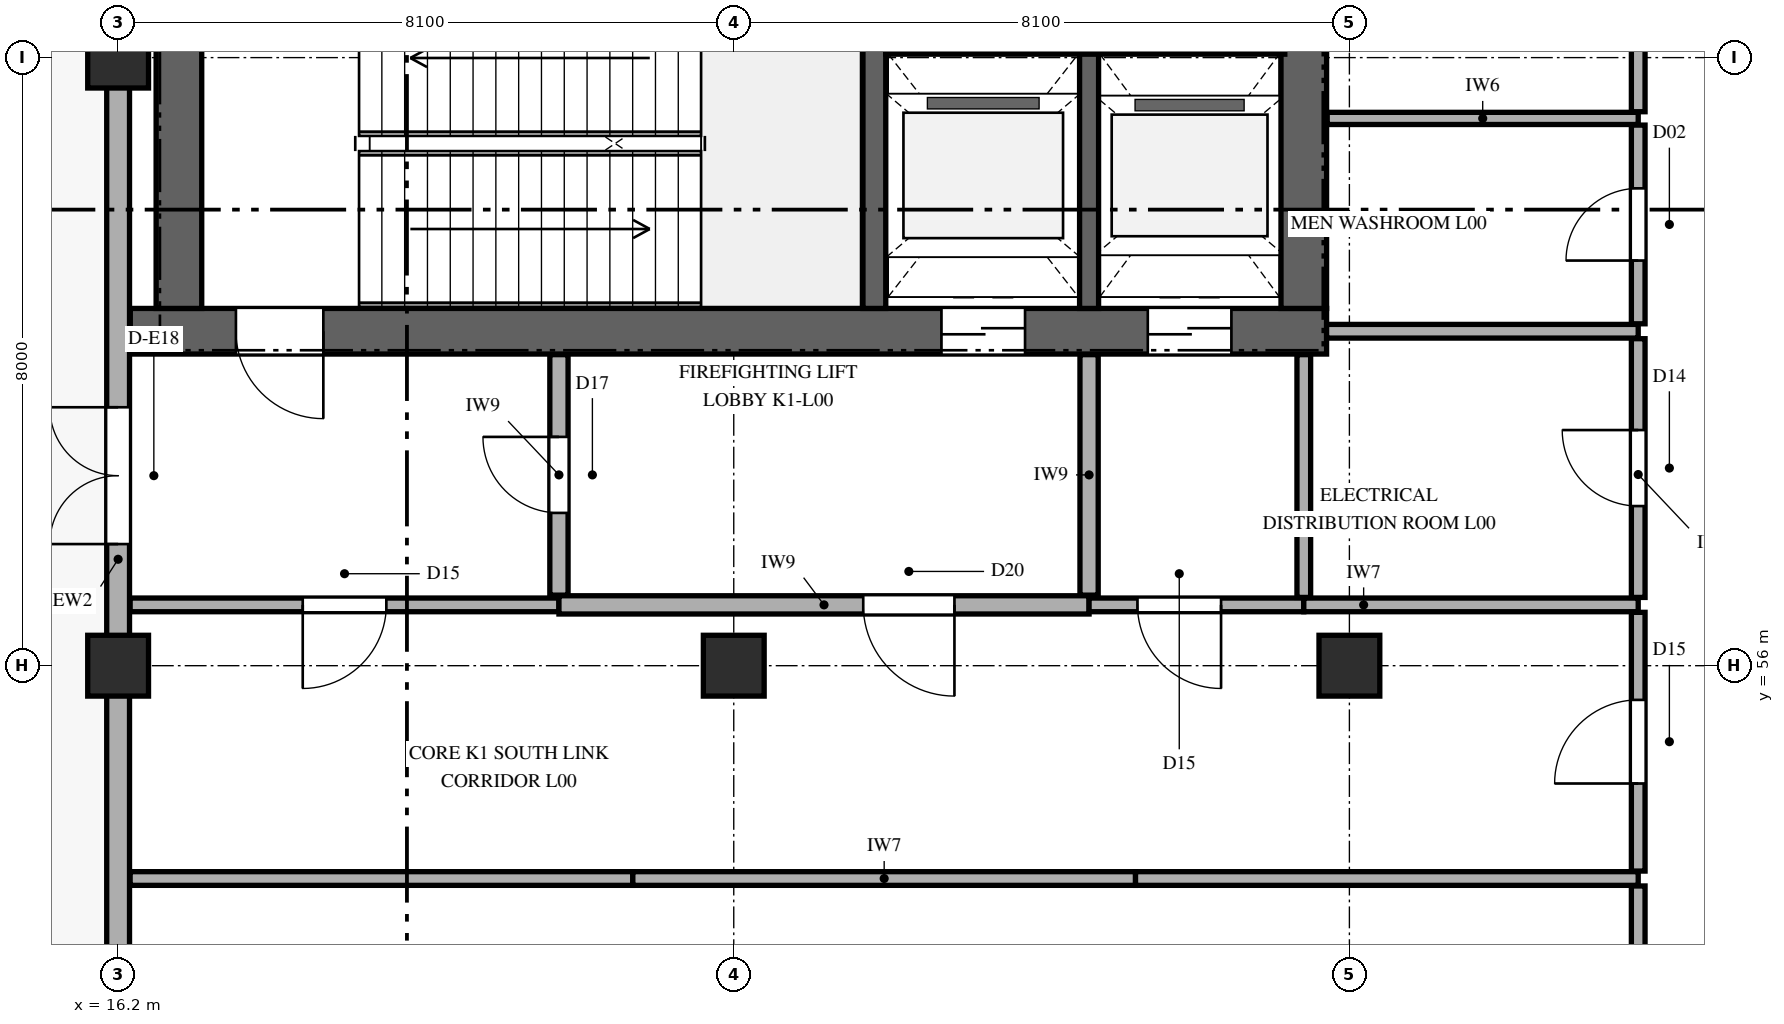
"""IFC4 building model, lengths in metres.
Left out: names, types, materials, properties, quantities, classifications, styles, units other than length and angle.
Written with IfcOpenShell. Run it as: python <this file> out.ifc"""

import sys

from ifc_helpers import new_model, si_unit, direction, frame, frame_2d, origin, origin_2d, place, context, subcontext, project, spatial, rectangle, extrude, element, fill, save


model = new_model("IFC4")
c1 = context("Model", 3, precision=1e-05, world=origin(), true_north=direction((0.0, 1.0)))
c2 = subcontext(c1, "Body", "Model", "MODEL_VIEW")
j1 = project(units=[si_unit("LENGTHUNIT", "METRE"), si_unit("PLANEANGLEUNIT", "RADIAN")], contexts=[c1])
p1 = place(None, origin())
s1 = spatial("IfcSite", under=j1, at=p1, CompositionType="ELEMENT")
p2 = place(p1, origin())
s2 = spatial("IfcBuilding", under=s1, at=p2, CompositionType="ELEMENT")
p3 = place(p2, origin())
s3 = spatial("IfcBuildingStorey", under=s2, at=p3, CompositionType="ELEMENT", Elevation=0.0)
p4 = place(p3, frame((16.36, 60.4, 0.0), z_axis=(0.0, 0.0, 1.0), x_axis=(1.0, 0.0, 0.0)))
e1 = element("IfcWall", 1, at=p4, inside=s3, PredefinedType="SHEAR", context=c2, shape_type="SweptSolid", body=[
    extrude(rectangle(XDim=15.74, YDim=0.6, at=frame_2d((7.87, 0.0))), origin(), (0.0, 0.0, 1.0), 5.4),
])
p5 = place(p4, frame((1.39, 0.0, 0.0)))
e2 = element("IfcOpeningElement", 2, at=p5, cuts=e1, PredefinedType="OPENING", context=c2, shape_type="SweptSolid", body=[
    extrude(rectangle(XDim=1.15, YDim=2.25, at=frame_2d((0.575, 1.125))), frame((0.0, 0.31, 0.0), z_axis=(0.0, -1.0, 0.0), x_axis=(1.0, 0.0, 0.0)), (0.0, 0.0, 1.0), 0.62),
])
p6 = place(p4, frame((10.673, 0.0, 0.0)))
e3 = element("IfcOpeningElement", 3, at=p6, cuts=e1, PredefinedType="OPENING", context=c2, shape_type="SweptSolid", body=[
    extrude(rectangle(XDim=1.1, YDim=2.2, at=frame_2d((0.55, 1.1))), frame((0.0, 0.31, 0.0), z_axis=(0.0, -1.0, 0.0), x_axis=(1.0, 0.0, 0.0)), (0.0, 0.0, 1.0), 0.62),
])
p7 = place(p4, frame((13.387, 0.0, 0.0)))
e4 = element("IfcOpeningElement", 4, at=p7, cuts=e1, PredefinedType="OPENING", context=c2, shape_type="SweptSolid", body=[
    extrude(rectangle(XDim=1.1, YDim=2.2, at=frame_2d((0.55, 1.1))), frame((0.0, 0.31, 0.0), z_axis=(0.0, -1.0, 0.0), x_axis=(1.0, 0.0, 0.0)), (0.0, 0.0, 1.0), 0.62),
])
for number, where, z_axis, x_axis in (
    (5, (17.0, 60.7, 0.0), (0.0, 0.0, 1.0), (0.0, 1.0, 0.0)),
    (6, (31.8, 60.7, 0.0), (0.0, 0.0, 1.0), (0.0, 1.0, 0.0)),
):
    element("IfcWall", number, at=place(p3, frame(where, z_axis=z_axis, x_axis=x_axis)), inside=s3, PredefinedType="SHEAR", context=c2, shape_type="SweptSolid", body=[
        extrude(rectangle(XDim=7.8, YDim=0.6, at=frame_2d((3.9, 0.0))), origin(), (0.0, 0.0, 1.0), 5.4),
    ])
p8 = place(p3, frame((26.15, 60.7, 0.0), z_axis=(0.0, 0.0, 1.0), x_axis=(0.0, 1.0, 0.0)))
e7 = element("IfcWall", 7, at=p8, inside=s3, PredefinedType="SHEAR", context=c2, shape_type="SweptSolid", body=[
    extrude(rectangle(XDim=7.8, YDim=0.3, at=frame_2d((3.9, 0.0))), origin(), (0.0, 0.0, 1.0), 5.4),
])
p9 = place(p3, frame((28.975, 60.7, 0.0), z_axis=(0.0, 0.0, 1.0), x_axis=(0.0, 1.0, 0.0)))
e8 = element("IfcWall", 8, at=p9, inside=s3, PredefinedType="SHEAR", context=c2, shape_type="SweptSolid", body=[
    extrude(rectangle(XDim=7.8, YDim=0.25, at=frame_2d((3.9, 0.0))), origin(), (0.0, 0.0, 1.0), 5.4),
])
for number, where, z_axis, x_axis in (
    (9, (16.2, 56.0, 0.0), (0.0, 0.0, 1.0), (1.0, 0.0, 0.0)),
    (10, (16.2, 64.0, 0.0), (0.0, 0.0, 1.0), (1.0, 0.0, 0.0)),
    (11, (24.3, 56.0, 0.0), (0.0, 0.0, 1.0), (1.0, 0.0, 0.0)),
    (12, (32.4, 56.0, 0.0), (0.0, 0.0, 1.0), (1.0, 0.0, 0.0)),
):
    element("IfcColumn", number, at=place(p3, frame(where, z_axis=z_axis, x_axis=x_axis)), inside=s3, PredefinedType="COLUMN", context=c2, shape_type="SweptSolid", body=[
        extrude(rectangle(XDim=0.8, YDim=0.8, at=origin_2d()), origin(), (0.0, 0.0, 1.0), 5.4),
    ])
p10 = place(p3, frame((16.2, 65.2, 0.0), z_axis=(0.0, 0.0, 1.0), x_axis=(0.0, -1.0, 0.0)))
e13 = element("IfcWall", 13, at=p10, inside=s3, PredefinedType="SOLIDWALL", context=c2, shape_type="SweptSolid", body=[
    extrude(rectangle(XDim=15.6, YDim=0.3, at=frame_2d((7.8, 0.0))), origin(), (0.0, 0.0, 1.0), 4.512),
])
p11 = place(p10, frame((5.8, 0.0, 0.0)))
e14 = element("IfcOpeningElement", 14, at=p11, cuts=e13, PredefinedType="OPENING", context=c2, shape_type="SweptSolid", body=[
    extrude(rectangle(XDim=1.8, YDim=2.4, at=frame_2d((0.9, 1.2))), frame((0.0, 0.16, 0.0), z_axis=(0.0, -1.0, 0.0), x_axis=(1.0, 0.0, 0.0)), (0.0, 0.0, 1.0), 0.32),
])
p12 = place(p3, frame((26.3, 64.12, 0.0), z_axis=(0.0, 0.0, 1.0), x_axis=(1.0, 0.0, 0.0)))
e15 = element("IfcWall", 15, at=p12, inside=s3, PredefinedType="PARTITIONING", context=c2, shape_type="SweptSolid", body=[
    extrude(rectangle(XDim=5.25, YDim=0.15, at=frame_2d((2.625, 0.0))), origin(), (0.0, 0.0, 1.0), 5.12),
])
for number, where, z_axis, x_axis in (
    (16, (16.358, 53.2, 0.0), (0.0, 0.0, 1.0), (1.0, 0.0, 0.0)),
    (17, (22.972, 53.2, 0.0), (0.0, 0.0, 1.0), (1.0, 0.0, 0.0)),
    (18, (29.586, 53.2, 0.0), (0.0, 0.0, 1.0), (1.0, 0.0, 0.0)),
):
    element("IfcWall", number, at=place(p3, frame(where, z_axis=z_axis, x_axis=x_axis)), inside=s3, PredefinedType="PARTITIONING", context=c2, shape_type="SweptSolid", body=[
        extrude(rectangle(XDim=6.614, YDim=0.18, at=frame_2d((3.307, 0.0))), origin(), (0.0, 0.0, 1.0), 5.12),
    ])
p13 = place(p3, frame((16.358, 56.8, 0.0), z_axis=(0.0, 0.0, 1.0), x_axis=(1.0, 0.0, 0.0)))
e19 = element("IfcWall", 19, at=p13, inside=s3, PredefinedType="PARTITIONING", context=c2, shape_type="SweptSolid", body=[
    extrude(rectangle(XDim=5.642, YDim=0.18, at=frame_2d((2.821, 0.0))), origin(), (0.0, 0.0, 1.0), 5.12),
])
p14 = place(p13, frame((2.271, 0.0, 0.0)))
e20 = element("IfcOpeningElement", 20, at=p14, cuts=e19, PredefinedType="OPENING", context=c2, shape_type="SweptSolid", body=[
    extrude(rectangle(XDim=1.1, YDim=2.2, at=frame_2d((0.55, 1.1))), frame((0.0, 0.1, 0.0), z_axis=(0.0, -1.0, 0.0), x_axis=(1.0, 0.0, 0.0)), (0.0, 0.0, 1.0), 0.2),
])
p15 = place(p3, frame((22.0, 56.8, 0.0), z_axis=(0.0, 0.0, 1.0), x_axis=(1.0, 0.0, 0.0)))
e21 = element("IfcWall", 21, at=p15, inside=s3, PredefinedType="PARTITIONING", context=c2, shape_type="SweptSolid", body=[
    extrude(rectangle(XDim=6.975, YDim=0.24, at=frame_2d((3.488, 0.0))), origin(), (0.0, 0.0, 1.0), 5.12),
])
p16 = place(p15, frame((4.003, 0.0, 0.0)))
e22 = element("IfcOpeningElement", 22, at=p16, cuts=e21, PredefinedType="OPENING", context=c2, shape_type="SweptSolid", body=[
    extrude(rectangle(XDim=1.2, YDim=2.3, at=frame_2d((0.6, 1.15))), frame((0.0, 0.13, 0.0), z_axis=(0.0, -1.0, 0.0), x_axis=(1.0, 0.0, 0.0)), (0.0, 0.0, 1.0), 0.26),
])
p17 = place(p3, frame((28.975, 56.8, 0.0), z_axis=(0.0, 0.0, 1.0), x_axis=(1.0, 0.0, 0.0)))
e23 = element("IfcWall", 23, at=p17, inside=s3, PredefinedType="PARTITIONING", context=c2, shape_type="SweptSolid", body=[
    extrude(rectangle(XDim=2.825, YDim=0.18, at=frame_2d((1.413, 0.0))), origin(), (0.0, 0.0, 1.0), 5.12),
])
p18 = place(p17, frame((0.636, 0.0, 0.0)))
e24 = element("IfcOpeningElement", 24, at=p18, cuts=e23, PredefinedType="OPENING", context=c2, shape_type="SweptSolid", body=[
    extrude(rectangle(XDim=1.1, YDim=2.2, at=frame_2d((0.55, 1.1))), frame((0.0, 0.1, 0.0), z_axis=(0.0, -1.0, 0.0), x_axis=(1.0, 0.0, 0.0)), (0.0, 0.0, 1.0), 0.2),
])
p19 = place(p3, frame((31.8, 56.8, 0.0), z_axis=(0.0, 0.0, 1.0), x_axis=(1.0, 0.0, 0.0)))
e25 = element("IfcWall", 25, at=p19, inside=s3, PredefinedType="PARTITIONING", context=c2, shape_type="SweptSolid", body=[
    extrude(rectangle(XDim=4.4, YDim=0.18, at=frame_2d((2.2, 0.0))), origin(), (0.0, 0.0, 1.0), 5.12),
])
p20 = place(p3, frame((32.1, 60.4, 0.0), z_axis=(0.0, 0.0, 1.0), x_axis=(1.0, 0.0, 0.0)))
e26 = element("IfcWall", 26, at=p20, inside=s3, PredefinedType="PARTITIONING", context=c2, shape_type="SweptSolid", body=[
    extrude(rectangle(XDim=4.1, YDim=0.18, at=frame_2d((2.05, 0.0))), origin(), (0.0, 0.0, 1.0), 5.12),
])
p21 = place(p3, frame((32.108, 63.2, 0.0), z_axis=(0.0, 0.0, 1.0), x_axis=(1.0, 0.0, 0.0)))
e27 = element("IfcWall", 27, at=p21, inside=s3, PredefinedType="PARTITIONING", context=c2, shape_type="SweptSolid", body=[
    extrude(rectangle(XDim=4.092, YDim=0.16, at=frame_2d((2.046, 0.0))), origin(), (0.0, 0.0, 1.0), 5.12),
])
p22 = place(p3, frame((22.0, 56.928, 0.0), z_axis=(0.0, 0.0, 1.0), x_axis=(0.0, 1.0, 0.0)))
e28 = element("IfcWall", 28, at=p22, inside=s3, PredefinedType="PARTITIONING", context=c2, shape_type="SweptSolid", body=[
    extrude(rectangle(XDim=3.164, YDim=0.24, at=frame_2d((1.582, 0.0))), origin(), (0.0, 0.0, 1.0), 5.12),
])
p23 = place(p22, frame((1.082, 0.0, 0.0)))
e29 = element("IfcOpeningElement", 29, at=p23, cuts=e28, PredefinedType="OPENING", context=c2, shape_type="SweptSolid", body=[
    extrude(rectangle(XDim=1.0, YDim=2.2, at=frame_2d((0.5, 1.1))), frame((0.0, 0.13, 0.0), z_axis=(0.0, -1.0, 0.0), x_axis=(1.0, 0.0, 0.0)), (0.0, 0.0, 1.0), 0.26),
])
p24 = place(p3, frame((28.975, 56.928, 0.0), z_axis=(0.0, 0.0, 1.0), x_axis=(0.0, 1.0, 0.0)))
e30 = element("IfcWall", 30, at=p24, inside=s3, PredefinedType="PARTITIONING", context=c2, shape_type="SweptSolid", body=[
    extrude(rectangle(XDim=3.164, YDim=0.24, at=frame_2d((1.582, 0.0))), origin(), (0.0, 0.0, 1.0), 5.12),
])
p25 = place(p3, frame((31.8, 56.898, 0.0), z_axis=(0.0, 0.0, 1.0), x_axis=(0.0, 1.0, 0.0)))
e31 = element("IfcWall", 31, at=p25, inside=s3, PredefinedType="PARTITIONING", context=c2, shape_type="SweptSolid", body=[
    extrude(rectangle(XDim=3.194, YDim=0.18, at=frame_2d((1.597, 0.0))), origin(), (0.0, 0.0, 1.0), 5.12),
])
p26 = place(p3, frame((36.2, 34.098, 0.0), z_axis=(0.0, 0.0, 1.0), x_axis=(0.0, 1.0, 0.0)))
e32 = element("IfcWall", 32, at=p26, inside=s3, PredefinedType="PARTITIONING", context=c2, shape_type="SweptSolid", body=[
    extrude(rectangle(XDim=19.004, YDim=0.18, at=frame_2d((9.502, 0.0))), origin(), (0.0, 0.0, 1.0), 4.705),
])
p27 = place(p26, frame((8.702, 0.0, 0.0)))
e33 = element("IfcOpeningElement", 33, at=p27, cuts=e32, PredefinedType="OPENING", context=c2, shape_type="SweptSolid", body=[
    extrude(rectangle(XDim=1.6, YDim=2.35, at=frame_2d((0.8, 1.175))), frame((0.0, 0.1, 0.0), z_axis=(0.0, -1.0, 0.0), x_axis=(1.0, 0.0, 0.0)), (0.0, 0.0, 1.0), 0.2),
])
p28 = place(p3, frame((36.2, 53.298, 0.0), z_axis=(0.0, 0.0, 1.0), x_axis=(0.0, 1.0, 0.0)))
e34 = element("IfcWall", 34, at=p28, inside=s3, PredefinedType="PARTITIONING", context=c2, shape_type="SweptSolid", body=[
    extrude(rectangle(XDim=3.404, YDim=0.18, at=frame_2d((1.702, 0.0))), origin(), (0.0, 0.0, 1.0), 4.705),
])
p29 = place(p28, frame((1.152, 0.0, 0.0)))
e35 = element("IfcOpeningElement", 35, at=p29, cuts=e34, PredefinedType="OPENING", context=c2, shape_type="SweptSolid", body=[
    extrude(rectangle(XDim=1.1, YDim=2.2, at=frame_2d((0.55, 1.1))), frame((0.0, 0.1, 0.0), z_axis=(0.0, -1.0, 0.0), x_axis=(1.0, 0.0, 0.0)), (0.0, 0.0, 1.0), 0.2),
])
p30 = place(p3, frame((36.2, 56.898, 0.0), z_axis=(0.0, 0.0, 1.0), x_axis=(0.0, 1.0, 0.0)))
e36 = element("IfcWall", 36, at=p30, inside=s3, PredefinedType="PARTITIONING", context=c2, shape_type="SweptSolid", body=[
    extrude(rectangle(XDim=3.404, YDim=0.18, at=frame_2d((1.702, 0.0))), origin(), (0.0, 0.0, 1.0), 5.12),
])
p31 = place(p30, frame((1.202, 0.0, 0.0)))
e37 = element("IfcOpeningElement", 37, at=p31, cuts=e36, PredefinedType="OPENING", context=c2, shape_type="SweptSolid", body=[
    extrude(rectangle(XDim=1.0, YDim=2.15, at=frame_2d((0.5, 1.075))), frame((0.0, 0.1, 0.0), z_axis=(0.0, -1.0, 0.0), x_axis=(1.0, 0.0, 0.0)), (0.0, 0.0, 1.0), 0.2),
])
p32 = place(p3, frame((36.2, 60.498, 0.0), z_axis=(0.0, 0.0, 1.0), x_axis=(0.0, 1.0, 0.0)))
e38 = element("IfcWall", 38, at=p32, inside=s3, PredefinedType="PARTITIONING", context=c2, shape_type="SweptSolid", body=[
    extrude(rectangle(XDim=2.614, YDim=0.18, at=frame_2d((1.307, 0.0))), origin(), (0.0, 0.0, 1.0), 5.12),
])
p33 = place(p32, frame((0.832, 0.0, 0.0)))
e39 = element("IfcOpeningElement", 39, at=p33, cuts=e38, PredefinedType="OPENING", context=c2, shape_type="SweptSolid", body=[
    extrude(rectangle(XDim=0.95, YDim=2.1, at=frame_2d((0.475, 1.05))), frame((0.0, 0.1, 0.0), z_axis=(0.0, -1.0, 0.0), x_axis=(1.0, 0.0, 0.0)), (0.0, 0.0, 1.0), 0.2),
])
p34 = place(p3, frame((36.2, 63.288, 0.0), z_axis=(0.0, 0.0, 1.0), x_axis=(0.0, 1.0, 0.0)))
e40 = element("IfcWall", 40, at=p34, inside=s3, PredefinedType="PARTITIONING", context=c2, shape_type="SweptSolid", body=[
    extrude(rectangle(XDim=2.624, YDim=0.18, at=frame_2d((1.312, 0.0))), origin(), (0.0, 0.0, 1.0), 5.12),
])
p35 = place(p34, frame((0.837, 0.0, 0.0)))
e41 = element("IfcOpeningElement", 41, at=p35, cuts=e40, PredefinedType="OPENING", context=c2, shape_type="SweptSolid", body=[
    extrude(rectangle(XDim=0.95, YDim=2.1, at=frame_2d((0.475, 1.05))), frame((0.0, 0.1, 0.0), z_axis=(0.0, -1.0, 0.0), x_axis=(1.0, 0.0, 0.0)), (0.0, 0.0, 1.0), 0.2),
])
p36 = place(p11, frame((1.8, 0.0, 0.0), z_axis=(0.0, 0.0, 1.0), x_axis=(-1.0, 0.0, 0.0)))
e42 = element("IfcDoor", 42, at=p36, inside=s3, OperationType="DOUBLE_DOOR_SINGLE_SWING", PredefinedType="DOOR", context=c2, shape_type="SweptSolid", body=[
    extrude(rectangle(XDim=1.8, YDim=2.4, at=frame_2d((0.9, 1.2))), frame((0.0, 0.025, 0.0), z_axis=(0.0, -1.0, 0.0), x_axis=(1.0, 0.0, 0.0)), (0.0, 0.0, 1.0), 0.05),
])
fill(e14, e42)
p37 = place(p5, frame((1.15, 0.0, 0.0), z_axis=(0.0, 0.0, 1.0), x_axis=(-1.0, 0.0, 0.0)))
e43 = element("IfcDoor", 43, at=p37, inside=s3, OperationType="SINGLE_SWING_RIGHT", PredefinedType="DOOR", context=c2, shape_type="SweptSolid", body=[
    extrude(rectangle(XDim=1.15, YDim=2.25, at=frame_2d((0.575, 1.125))), frame((0.0, 0.025, 0.0), z_axis=(0.0, -1.0, 0.0), x_axis=(1.0, 0.0, 0.0)), (0.0, 0.0, 1.0), 0.05),
])
fill(e2, e43)
p38 = place(p6, frame((1.1, 0.0, 0.0), z_axis=(0.0, 0.0, 1.0), x_axis=(-1.0, 0.0, 0.0)))
e44 = element("IfcDoor", 44, at=p38, inside=s3, OperationType="DOUBLE_DOOR_SLIDING", PredefinedType="DOOR", context=c2, shape_type="SweptSolid", body=[
    extrude(rectangle(XDim=1.1, YDim=2.2, at=frame_2d((0.55, 1.1))), frame((0.0, 0.025, 0.0), z_axis=(0.0, -1.0, 0.0), x_axis=(1.0, 0.0, 0.0)), (0.0, 0.0, 1.0), 0.05),
])
fill(e3, e44)
p39 = place(p7, frame((1.1, 0.0, 0.0), z_axis=(0.0, 0.0, 1.0), x_axis=(-1.0, 0.0, 0.0)))
e45 = element("IfcDoor", 45, at=p39, inside=s3, OperationType="DOUBLE_DOOR_SLIDING", PredefinedType="DOOR", context=c2, shape_type="SweptSolid", body=[
    extrude(rectangle(XDim=1.1, YDim=2.2, at=frame_2d((0.55, 1.1))), frame((0.0, 0.025, 0.0), z_axis=(0.0, -1.0, 0.0), x_axis=(1.0, 0.0, 0.0)), (0.0, 0.0, 1.0), 0.05),
])
fill(e4, e45)
p40 = place(p14, frame((1.1, 0.0, 0.0), z_axis=(0.0, 0.0, 1.0), x_axis=(-1.0, 0.0, 0.0)))
e46 = element("IfcDoor", 46, at=p40, inside=s3, OperationType="SINGLE_SWING_LEFT", PredefinedType="DOOR", context=c2, shape_type="SweptSolid", body=[
    extrude(rectangle(XDim=1.1, YDim=2.2, at=frame_2d((0.55, 1.1))), frame((0.0, 0.025, 0.0), z_axis=(0.0, -1.0, 0.0), x_axis=(1.0, 0.0, 0.0)), (0.0, 0.0, 1.0), 0.05),
])
fill(e20, e46)
p41 = place(p16, frame((1.2, 0.0, 0.0), z_axis=(0.0, 0.0, 1.0), x_axis=(-1.0, 0.0, 0.0)))
e47 = element("IfcDoor", 47, at=p41, inside=s3, OperationType="SINGLE_SWING_RIGHT", PredefinedType="DOOR", context=c2, shape_type="SweptSolid", body=[
    extrude(rectangle(XDim=1.2, YDim=2.3, at=frame_2d((0.6, 1.15))), frame((0.0, 0.025, 0.0), z_axis=(0.0, -1.0, 0.0), x_axis=(1.0, 0.0, 0.0)), (0.0, 0.0, 1.0), 0.05),
])
fill(e22, e47)
p42 = place(p18, frame((1.1, 0.0, 0.0), z_axis=(0.0, 0.0, 1.0), x_axis=(-1.0, 0.0, 0.0)))
e48 = element("IfcDoor", 48, at=p42, inside=s3, OperationType="SINGLE_SWING_RIGHT", PredefinedType="DOOR", context=c2, shape_type="SweptSolid", body=[
    extrude(rectangle(XDim=1.1, YDim=2.2, at=frame_2d((0.55, 1.1))), frame((0.0, 0.025, 0.0), z_axis=(0.0, -1.0, 0.0), x_axis=(1.0, 0.0, 0.0)), (0.0, 0.0, 1.0), 0.05),
])
fill(e24, e48)
p43 = place(p23, origin())
e49 = element("IfcDoor", 49, at=p43, inside=s3, OperationType="SINGLE_SWING_RIGHT", PredefinedType="DOOR", context=c2, shape_type="SweptSolid", body=[
    extrude(rectangle(XDim=1.0, YDim=2.2, at=frame_2d((0.5, 1.1))), frame((0.0, 0.025, 0.0), z_axis=(0.0, -1.0, 0.0), x_axis=(1.0, 0.0, 0.0)), (0.0, 0.0, 1.0), 0.05),
])
fill(e29, e49)
p44 = place(p29, origin())
e50 = element("IfcDoor", 50, at=p44, inside=s3, OperationType="SINGLE_SWING_LEFT", PredefinedType="DOOR", context=c2, shape_type="SweptSolid", body=[
    extrude(rectangle(XDim=1.1, YDim=2.2, at=frame_2d((0.55, 1.1))), frame((0.0, 0.025, 0.0), z_axis=(0.0, -1.0, 0.0), x_axis=(1.0, 0.0, 0.0)), (0.0, 0.0, 1.0), 0.05),
])
fill(e35, e50)
p45 = place(p31, origin())
e51 = element("IfcDoor", 51, at=p45, inside=s3, OperationType="SINGLE_SWING_RIGHT", PredefinedType="DOOR", context=c2, shape_type="SweptSolid", body=[
    extrude(rectangle(XDim=1.0, YDim=2.15, at=frame_2d((0.5, 1.075))), frame((0.0, 0.025, 0.0), z_axis=(0.0, -1.0, 0.0), x_axis=(1.0, 0.0, 0.0)), (0.0, 0.0, 1.0), 0.05),
])
fill(e37, e51)
p46 = place(p33, origin())
e52 = element("IfcDoor", 52, at=p46, inside=s3, OperationType="SINGLE_SWING_LEFT", PredefinedType="DOOR", context=c2, shape_type="SweptSolid", body=[
    extrude(rectangle(XDim=0.95, YDim=2.1, at=frame_2d((0.475, 1.05))), frame((0.0, 0.025, 0.0), z_axis=(0.0, -1.0, 0.0), x_axis=(1.0, 0.0, 0.0)), (0.0, 0.0, 1.0), 0.05),
])
fill(e39, e52)
save(model, sys.argv[1])
